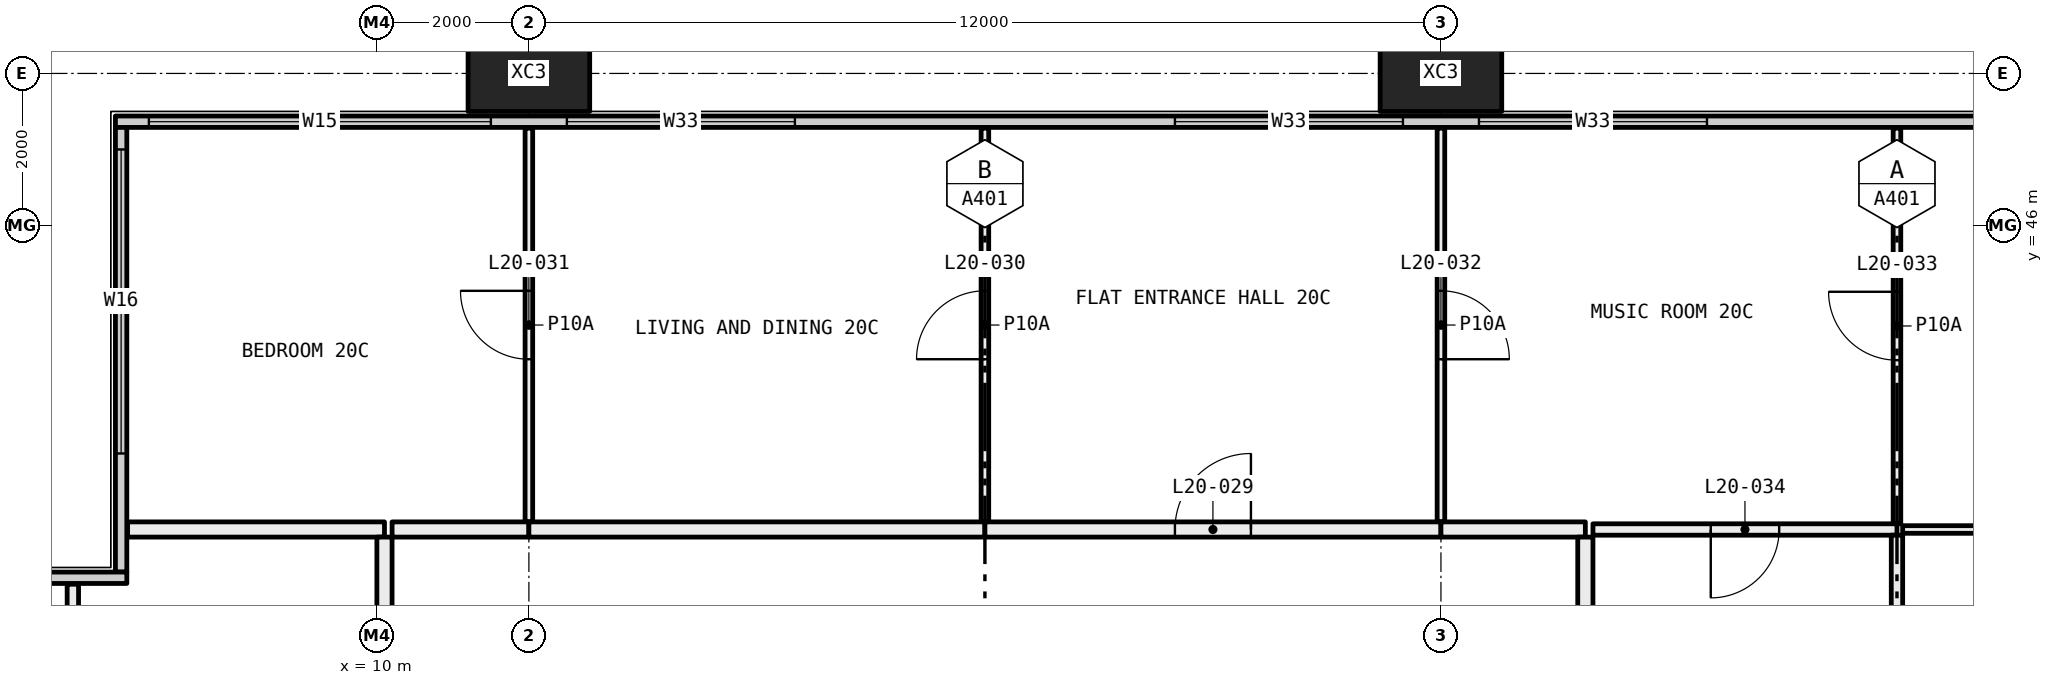
"""IFC4 building model, lengths in metres.
Left out: names, types, materials, properties, quantities, classifications, styles, units other than length and angle.
Written with IfcOpenShell. Run it as: python <this file> out.ifc"""

import sys

from ifc_helpers import new_model, si_unit, direction, frame, frame_2d, origin, origin_2d, place, context, subcontext, project, spatial, rectangle, hollow_rectangle, extrude, element, fill, save


model = new_model("IFC4")
c1 = context("Model", 3, precision=1e-05, world=origin(), true_north=direction((0.0, 1.0)))
c2 = subcontext(c1, "Body", "Model", "MODEL_VIEW")
j1 = project(units=[si_unit("LENGTHUNIT", "METRE"), si_unit("PLANEANGLEUNIT", "RADIAN")], contexts=[c1])
p1 = place(None, origin())
s1 = spatial("IfcSite", under=j1, at=p1, CompositionType="ELEMENT")
p2 = place(p1, origin())
s2 = spatial("IfcBuilding", under=s1, at=p2, CompositionType="ELEMENT")
p3 = place(p2, frame((0.0, 0.0, 81.75)))
s3 = spatial("IfcBuildingStorey", under=s2, at=p3, CompositionType="ELEMENT", Elevation=81.75)
for number, where, z_axis, x_axis in (
    (1, (12.0, 48.0, -0.4), (0.0, 0.0, 1.0), (1.0, 0.0, 0.0)),
    (2, (24.0, 48.0, -0.4), (0.0, 0.0, 1.0), (1.0, 0.0, 0.0)),
):
    element("IfcColumn", number, at=place(p3, frame(where, z_axis=z_axis, x_axis=x_axis)), inside=s3, PredefinedType="COLUMN", context=c2, shape_type="SweptSolid", body=[
        extrude(hollow_rectangle(XDim=1.6, YDim=1.0, WallThickness=0.065, at=origin_2d()), origin(), (0.0, 0.0, 1.0), 3.45),
    ])
p4 = place(p3, frame((6.56, 47.365, 0.0), z_axis=(0.0, 0.0, 1.0), x_axis=(1.0, 0.0, 0.0)))
e3 = element("IfcWall", 3, at=p4, inside=s3, PredefinedType="ELEMENTEDWALL", context=c2, shape_type="SweptSolid", body=[
    extrude(rectangle(XDim=58.88, YDim=0.15, at=frame_2d((29.44, 0.0))), origin(), (0.0, 0.0, 1.0), 3.05),
])
p5 = place(p4, frame((0.44, 0.0, 0.45)))
e4 = element("IfcOpeningElement", 4, at=p5, cuts=e3, PredefinedType="OPENING", context=c2, shape_type="SweptSolid", body=[
    extrude(rectangle(XDim=4.5, YDim=2.55, at=frame_2d((2.25, 1.275))), frame((0.0, 0.085, 0.0), z_axis=(0.0, -1.0, 0.0), x_axis=(1.0, 0.0, 0.0)), (0.0, 0.0, 1.0), 0.17),
])
p6 = place(p4, frame((5.94, 0.0, 0.45)))
e5 = element("IfcOpeningElement", 5, at=p6, cuts=e3, PredefinedType="OPENING", context=c2, shape_type="SweptSolid", body=[
    extrude(rectangle(XDim=3.0, YDim=2.55, at=frame_2d((1.5, 1.275))), frame((0.0, 0.085, 0.0), z_axis=(0.0, -1.0, 0.0), x_axis=(1.0, 0.0, 0.0)), (0.0, 0.0, 1.0), 0.17),
])
p7 = place(p4, frame((13.94, 0.0, 0.45)))
e6 = element("IfcOpeningElement", 6, at=p7, cuts=e3, PredefinedType="OPENING", context=c2, shape_type="SweptSolid", body=[
    extrude(rectangle(XDim=3.0, YDim=2.55, at=frame_2d((1.5, 1.275))), frame((0.0, 0.085, 0.0), z_axis=(0.0, -1.0, 0.0), x_axis=(1.0, 0.0, 0.0)), (0.0, 0.0, 1.0), 0.17),
])
p8 = place(p4, frame((17.94, 0.0, 0.45)))
e7 = element("IfcOpeningElement", 7, at=p8, cuts=e3, PredefinedType="OPENING", context=c2, shape_type="SweptSolid", body=[
    extrude(rectangle(XDim=3.0, YDim=2.55, at=frame_2d((1.5, 1.275))), frame((0.0, 0.085, 0.0), z_axis=(0.0, -1.0, 0.0), x_axis=(1.0, 0.0, 0.0)), (0.0, 0.0, 1.0), 0.17),
])
p9 = place(p4, frame((26.94, 0.0, 0.45)))
e8 = element("IfcOpeningElement", 8, at=p9, cuts=e3, PredefinedType="OPENING", context=c2, shape_type="SweptSolid", body=[
    extrude(rectangle(XDim=2.0, YDim=2.55, at=frame_2d((1.0, 1.275))), frame((0.0, 0.085, 0.0), z_axis=(0.0, -1.0, 0.0), x_axis=(1.0, 0.0, 0.0)), (0.0, 0.0, 1.0), 0.17),
])
p10 = place(p4, frame((29.94, 0.0, 0.45)))
e9 = element("IfcOpeningElement", 9, at=p10, cuts=e3, PredefinedType="OPENING", context=c2, shape_type="SweptSolid", body=[
    extrude(rectangle(XDim=3.0, YDim=2.55, at=frame_2d((1.5, 1.275))), frame((0.0, 0.085, 0.0), z_axis=(0.0, -1.0, 0.0), x_axis=(1.0, 0.0, 0.0)), (0.0, 0.0, 1.0), 0.17),
])
p11 = place(p4, frame((37.94, 0.0, 0.45)))
e10 = element("IfcOpeningElement", 10, at=p11, cuts=e3, PredefinedType="OPENING", context=c2, shape_type="SweptSolid", body=[
    extrude(rectangle(XDim=3.0, YDim=2.55, at=frame_2d((1.5, 1.275))), frame((0.0, 0.085, 0.0), z_axis=(0.0, -1.0, 0.0), x_axis=(1.0, 0.0, 0.0)), (0.0, 0.0, 1.0), 0.17),
])
p12 = place(p4, frame((41.94, 0.0, 0.45)))
e11 = element("IfcOpeningElement", 11, at=p12, cuts=e3, PredefinedType="OPENING", context=c2, shape_type="SweptSolid", body=[
    extrude(rectangle(XDim=3.0, YDim=2.55, at=frame_2d((1.5, 1.275))), frame((0.0, 0.085, 0.0), z_axis=(0.0, -1.0, 0.0), x_axis=(1.0, 0.0, 0.0)), (0.0, 0.0, 1.0), 0.17),
])
p13 = place(p4, frame((50.94, 0.0, 0.45)))
e12 = element("IfcOpeningElement", 12, at=p13, cuts=e3, PredefinedType="OPENING", context=c2, shape_type="SweptSolid", body=[
    extrude(rectangle(XDim=2.0, YDim=2.55, at=frame_2d((1.0, 1.275))), frame((0.0, 0.085, 0.0), z_axis=(0.0, -1.0, 0.0), x_axis=(1.0, 0.0, 0.0)), (0.0, 0.0, 1.0), 0.17),
])
p14 = place(p4, frame((53.94, 0.0, 0.45)))
e13 = element("IfcOpeningElement", 13, at=p14, cuts=e3, PredefinedType="OPENING", context=c2, shape_type="SweptSolid", body=[
    extrude(rectangle(XDim=4.5, YDim=2.55, at=frame_2d((2.25, 1.275))), frame((0.0, 0.085, 0.0), z_axis=(0.0, -1.0, 0.0), x_axis=(1.0, 0.0, 0.0)), (0.0, 0.0, 1.0), 0.17),
])
p15 = place(p3, frame((6.635, 41.44, 0.0), z_axis=(0.0, 0.0, 1.0), x_axis=(0.0, 1.0, 0.0)))
e14 = element("IfcWall", 14, at=p15, inside=s3, PredefinedType="ELEMENTEDWALL", context=c2, shape_type="SweptSolid", body=[
    extrude(rectangle(XDim=5.85, YDim=0.15, at=frame_2d((2.925, 0.0))), origin(), (0.0, 0.0, 1.0), 3.05),
])
p16 = place(p15, frame((1.56, 0.0, 0.45)))
e15 = element("IfcOpeningElement", 15, at=p16, cuts=e14, PredefinedType="OPENING", context=c2, shape_type="SweptSolid", body=[
    extrude(rectangle(XDim=4.0, YDim=2.55, at=frame_2d((2.0, 1.275))), frame((0.0, 0.085, 0.0), z_axis=(0.0, -1.0, 0.0), x_axis=(1.0, 0.0, 0.0)), (0.0, 0.0, 1.0), 0.17),
])
p17 = place(p3, frame((0.56, 41.365, 0.0), z_axis=(0.0, 0.0, 1.0), x_axis=(1.0, 0.0, 0.0)))
e16 = element("IfcWall", 16, at=p17, inside=s3, PredefinedType="ELEMENTEDWALL", context=c2, shape_type="SweptSolid", body=[
    extrude(rectangle(XDim=6.15, YDim=0.15, at=frame_2d((3.075, 0.0))), origin(), (0.0, 0.0, 1.0), 3.05),
])
p18 = place(p17, frame((0.44, 0.0, 0.45)))
e17 = element("IfcOpeningElement", 17, at=p18, cuts=e16, PredefinedType="OPENING", context=c2, shape_type="SweptSolid", body=[
    extrude(rectangle(XDim=4.0, YDim=2.55, at=frame_2d((2.0, 1.275))), frame((0.0, 0.085, 0.0), z_axis=(0.0, -1.0, 0.0), x_axis=(1.0, 0.0, 0.0)), (0.0, 0.0, 1.0), 0.17),
])
p19 = place(p3, frame((6.0, 37.5, 0.0), z_axis=(0.0, 0.0, 1.0), x_axis=(0.0, 1.0, 0.0)))
e18 = element("IfcWall", 18, at=p19, inside=s3, PredefinedType="PARTITIONING", context=c2, shape_type="SweptSolid", body=[
    extrude(rectangle(XDim=3.78, YDim=0.15, at=frame_2d((1.89, 0.0))), origin(), (0.0, 0.0, 1.0), 3.05),
])
p20 = place(p3, frame((10.1, 42.0, 0.0), z_axis=(0.0, 0.0, 1.0), x_axis=(-1.0, 0.0, 0.0)))
e19 = element("IfcWall", 19, at=p20, inside=s3, PredefinedType="PARTITIONING", context=c2, shape_type="SweptSolid", body=[
    extrude(rectangle(XDim=3.38, YDim=0.2, at=frame_2d((1.69, 0.0))), origin(), (0.0, 0.0, 1.0), 3.05),
])
p21 = place(p3, frame((10.1, 37.5, 0.0), z_axis=(0.0, 0.0, 1.0), x_axis=(0.0, 1.0, 0.0)))
e20 = element("IfcWall", 20, at=p21, inside=s3, PredefinedType="PARTITIONING", context=c2, shape_type="SweptSolid", body=[
    extrude(rectangle(XDim=4.4, YDim=0.2, at=frame_2d((2.2, 0.0))), origin(), (0.0, 0.0, 1.0), 3.05),
])
p22 = place(p3, frame((12.0, 42.1, 0.0), z_axis=(0.0, 0.0, 1.0), x_axis=(0.0, 1.0, 0.0)))
e21 = element("IfcWall", 21, at=p22, inside=s3, PredefinedType="PARTITIONING", context=c2, shape_type="SweptSolid", body=[
    extrude(rectangle(XDim=5.18, YDim=0.1, at=frame_2d((2.59, 0.0))), origin(), (0.0, 0.0, 1.0), 3.05),
])
p23 = place(p22, frame((2.14, 0.0, 0.0)))
e22 = element("IfcOpeningElement", 22, at=p23, cuts=e21, PredefinedType="OPENING", context=c2, shape_type="SweptSolid", body=[
    extrude(rectangle(XDim=0.9, YDim=2.1, at=frame_2d((0.45, 1.05))), frame((0.0, 0.06, 0.0), z_axis=(0.0, -1.0, 0.0), x_axis=(1.0, 0.0, 0.0)), (0.0, 0.0, 1.0), 0.12),
])
p24 = place(p3, frame((10.2, 42.0, 0.0), z_axis=(0.0, 0.0, 1.0), x_axis=(1.0, 0.0, 0.0)))
e23 = element("IfcWall", 23, at=p24, inside=s3, PredefinedType="PARTITIONING", context=c2, shape_type="SweptSolid", body=[
    extrude(rectangle(XDim=1.8, YDim=0.2, at=frame_2d((0.9, 0.0))), origin(), (0.0, 0.0, 1.0), 3.05),
])
p25 = place(p3, frame((18.0, 42.1, 0.0), z_axis=(0.0, 0.0, 1.0), x_axis=(0.0, 1.0, 0.0)))
e24 = element("IfcWall", 24, at=p25, inside=s3, PredefinedType="PARTITIONING", context=c2, shape_type="SweptSolid", body=[
    extrude(rectangle(XDim=5.18, YDim=0.1, at=frame_2d((2.59, 0.0))), origin(), (0.0, 0.0, 1.0), 3.05),
])
p26 = place(p25, frame((2.14, 0.0, 0.0)))
e25 = element("IfcOpeningElement", 25, at=p26, cuts=e24, PredefinedType="OPENING", context=c2, shape_type="SweptSolid", body=[
    extrude(rectangle(XDim=0.9, YDim=2.1, at=frame_2d((0.45, 1.05))), frame((0.0, 0.06, 0.0), z_axis=(0.0, -1.0, 0.0), x_axis=(1.0, 0.0, 0.0)), (0.0, 0.0, 1.0), 0.12),
])
p27 = place(p3, frame((12.0, 42.0, 0.0), z_axis=(0.0, 0.0, 1.0), x_axis=(1.0, 0.0, 0.0)))
e26 = element("IfcWall", 26, at=p27, inside=s3, PredefinedType="PARTITIONING", context=c2, shape_type="SweptSolid", body=[
    extrude(rectangle(XDim=6.0, YDim=0.2, at=frame_2d((3.0, 0.0))), origin(), (0.0, 0.0, 1.0), 3.05),
])
p28 = place(p3, frame((24.0, 42.1, 0.0), z_axis=(0.0, 0.0, 1.0), x_axis=(0.0, 1.0, 0.0)))
e27 = element("IfcWall", 27, at=p28, inside=s3, PredefinedType="PARTITIONING", context=c2, shape_type="SweptSolid", body=[
    extrude(rectangle(XDim=5.18, YDim=0.1, at=frame_2d((2.59, 0.0))), origin(), (0.0, 0.0, 1.0), 3.05),
])
p29 = place(p28, frame((2.14, 0.0, 0.0)))
e28 = element("IfcOpeningElement", 28, at=p29, cuts=e27, PredefinedType="OPENING", context=c2, shape_type="SweptSolid", body=[
    extrude(rectangle(XDim=0.9, YDim=2.1, at=frame_2d((0.45, 1.05))), frame((0.0, 0.06, 0.0), z_axis=(0.0, -1.0, 0.0), x_axis=(1.0, 0.0, 0.0)), (0.0, 0.0, 1.0), 0.12),
])
p30 = place(p3, frame((18.0, 42.0, 0.0), z_axis=(0.0, 0.0, 1.0), x_axis=(1.0, 0.0, 0.0)))
e29 = element("IfcWall", 29, at=p30, inside=s3, PredefinedType="PARTITIONING", context=c2, shape_type="SweptSolid", body=[
    extrude(rectangle(XDim=6.0, YDim=0.2, at=frame_2d((3.0, 0.0))), origin(), (0.0, 0.0, 1.0), 3.05),
])
p31 = place(p30, frame((2.5, 0.0, 0.0)))
e30 = element("IfcOpeningElement", 30, at=p31, cuts=e29, PredefinedType="OPENING", context=c2, shape_type="SweptSolid", body=[
    extrude(rectangle(XDim=1.0, YDim=2.1, at=frame_2d((0.5, 1.05))), frame((0.0, 0.11, 0.0), z_axis=(0.0, -1.0, 0.0), x_axis=(1.0, 0.0, 0.0)), (0.0, 0.0, 1.0), 0.22),
])
p32 = place(p3, frame((30.0, 42.075, 0.0), z_axis=(0.0, 0.0, 1.0), x_axis=(0.0, 1.0, 0.0)))
e31 = element("IfcWall", 31, at=p32, inside=s3, PredefinedType="PARTITIONING", context=c2, shape_type="SweptSolid", body=[
    extrude(rectangle(XDim=5.205, YDim=0.1, at=frame_2d((2.603, 0.0))), origin(), (0.0, 0.0, 1.0), 3.05),
])
p33 = place(p32, frame((2.153, 0.0, 0.0)))
e32 = element("IfcOpeningElement", 32, at=p33, cuts=e31, PredefinedType="OPENING", context=c2, shape_type="SweptSolid", body=[
    extrude(rectangle(XDim=0.9, YDim=2.1, at=frame_2d((0.45, 1.05))), frame((0.0, 0.06, 0.0), z_axis=(0.0, -1.0, 0.0), x_axis=(1.0, 0.0, 0.0)), (0.0, 0.0, 1.0), 0.12),
])
p34 = place(p3, frame((26.0, 42.0, 0.0), z_axis=(0.0, 0.0, 1.0), x_axis=(1.0, 0.0, 0.0)))
e33 = element("IfcWall", 33, at=p34, inside=s3, PredefinedType="PARTITIONING", context=c2, shape_type="SweptSolid", body=[
    extrude(rectangle(XDim=4.0, YDim=0.15, at=frame_2d((2.0, 0.0))), origin(), (0.0, 0.0, 1.0), 3.05),
])
p35 = place(p34, frame((1.55, 0.0, 0.0)))
e34 = element("IfcOpeningElement", 34, at=p35, cuts=e33, PredefinedType="OPENING", context=c2, shape_type="SweptSolid", body=[
    extrude(rectangle(XDim=0.9, YDim=2.1, at=frame_2d((0.45, 1.05))), frame((0.0, 0.085, 0.0), z_axis=(0.0, -1.0, 0.0), x_axis=(1.0, 0.0, 0.0)), (0.0, 0.0, 1.0), 0.17),
])
p36 = place(p3, frame((24.0, 42.0, 0.0), z_axis=(0.0, 0.0, 1.0), x_axis=(1.0, 0.0, 0.0)))
e35 = element("IfcWall", 35, at=p36, inside=s3, PredefinedType="PARTITIONING", context=c2, shape_type="SweptSolid", body=[
    extrude(rectangle(XDim=1.9, YDim=0.2, at=frame_2d((0.95, 0.0))), origin(), (0.0, 0.0, 1.0), 3.05),
])
p37 = place(p3, frame((30.075, 42.0, 0.0), z_axis=(0.0, 0.0, 1.0), x_axis=(1.0, 0.0, 0.0)))
e36 = element("IfcWall", 36, at=p37, inside=s3, PredefinedType="PARTITIONING", context=c2, shape_type="SweptSolid", body=[
    extrude(rectangle(XDim=4.425, YDim=0.1, at=frame_2d((2.212, 0.0))), origin(), (0.0, 0.0, 1.0), 3.05),
])
p38 = place(p37, frame((1.762, 0.0, 0.0)))
e37 = element("IfcOpeningElement", 37, at=p38, cuts=e36, PredefinedType="OPENING", context=c2, shape_type="SweptSolid", body=[
    extrude(rectangle(XDim=0.9, YDim=2.1, at=frame_2d((0.45, 1.05))), frame((0.0, 0.06, 0.0), z_axis=(0.0, -1.0, 0.0), x_axis=(1.0, 0.0, 0.0)), (0.0, 0.0, 1.0), 0.12),
])
p39 = place(p3, frame((30.0, 38.175, 0.0), z_axis=(0.0, 0.0, 1.0), x_axis=(0.0, 1.0, 0.0)))
e38 = element("IfcWall", 38, at=p39, inside=s3, PredefinedType="PARTITIONING", context=c2, shape_type="SweptSolid", body=[
    extrude(rectangle(XDim=3.75, YDim=0.15, at=frame_2d((1.875, 0.0))), origin(), (0.0, 0.0, 1.0), 3.05),
])
p40 = place(p3, frame((25.9, 41.9, 0.0), z_axis=(0.0, 0.0, 1.0), x_axis=(0.0, -1.0, 0.0)))
e39 = element("IfcWall", 39, at=p40, inside=s3, PredefinedType="PARTITIONING", context=c2, shape_type="SweptSolid", body=[
    extrude(rectangle(XDim=3.8, YDim=0.2, at=frame_2d((1.9, 0.0))), origin(), (0.0, 0.0, 1.0), 3.05),
])
p41 = place(p5, origin())
e40 = element("IfcWindow", 40, at=p41, inside=s3, PartitioningType="SINGLE_PANEL", PredefinedType="WINDOW", context=c2, shape_type="SweptSolid", body=[
    extrude(rectangle(XDim=4.5, YDim=2.55, at=frame_2d((2.25, 1.275))), frame((0.0, 0.03, 0.0), z_axis=(0.0, -1.0, 0.0), x_axis=(1.0, 0.0, 0.0)), (0.0, 0.0, 1.0), 0.06),
])
fill(e4, e40)
p42 = place(p6, origin())
e41 = element("IfcWindow", 41, at=p42, inside=s3, PartitioningType="SINGLE_PANEL", PredefinedType="WINDOW", context=c2, shape_type="SweptSolid", body=[
    extrude(rectangle(XDim=3.0, YDim=2.55, at=frame_2d((1.5, 1.275))), frame((0.0, 0.03, 0.0), z_axis=(0.0, -1.0, 0.0), x_axis=(1.0, 0.0, 0.0)), (0.0, 0.0, 1.0), 0.06),
])
fill(e5, e41)
p43 = place(p7, origin())
e42 = element("IfcWindow", 42, at=p43, inside=s3, PartitioningType="SINGLE_PANEL", PredefinedType="WINDOW", context=c2, shape_type="SweptSolid", body=[
    extrude(rectangle(XDim=3.0, YDim=2.55, at=frame_2d((1.5, 1.275))), frame((0.0, 0.03, 0.0), z_axis=(0.0, -1.0, 0.0), x_axis=(1.0, 0.0, 0.0)), (0.0, 0.0, 1.0), 0.06),
])
fill(e6, e42)
p44 = place(p8, origin())
e43 = element("IfcWindow", 43, at=p44, inside=s3, PartitioningType="SINGLE_PANEL", PredefinedType="WINDOW", context=c2, shape_type="SweptSolid", body=[
    extrude(rectangle(XDim=3.0, YDim=2.55, at=frame_2d((1.5, 1.275))), frame((0.0, 0.03, 0.0), z_axis=(0.0, -1.0, 0.0), x_axis=(1.0, 0.0, 0.0)), (0.0, 0.0, 1.0), 0.06),
])
fill(e7, e43)
p45 = place(p16, origin())
e44 = element("IfcWindow", 44, at=p45, inside=s3, PartitioningType="SINGLE_PANEL", PredefinedType="WINDOW", context=c2, shape_type="SweptSolid", body=[
    extrude(rectangle(XDim=4.0, YDim=2.55, at=frame_2d((2.0, 1.275))), frame((0.0, 0.03, 0.0), z_axis=(0.0, -1.0, 0.0), x_axis=(1.0, 0.0, 0.0)), (0.0, 0.0, 1.0), 0.06),
])
fill(e15, e44)
p46 = place(p31, origin())
e45 = element("IfcDoor", 45, at=p46, inside=s3, OperationType="SINGLE_SWING_LEFT", PredefinedType="DOOR", context=c2, shape_type="SweptSolid", body=[
    extrude(rectangle(XDim=1.0, YDim=2.1, at=frame_2d((0.5, 1.05))), frame((0.0, 0.025, 0.0), z_axis=(0.0, -1.0, 0.0), x_axis=(1.0, 0.0, 0.0)), (0.0, 0.0, 1.0), 0.05),
])
fill(e30, e45)
p47 = place(p26, origin())
e46 = element("IfcDoor", 46, at=p47, inside=s3, OperationType="SINGLE_SWING_RIGHT", PredefinedType="DOOR", context=c2, shape_type="SweptSolid", body=[
    extrude(rectangle(XDim=0.9, YDim=2.1, at=frame_2d((0.45, 1.05))), frame((0.0, 0.025, 0.0), z_axis=(0.0, -1.0, 0.0), x_axis=(1.0, 0.0, 0.0)), (0.0, 0.0, 1.0), 0.05),
])
fill(e25, e46)
p48 = place(p23, origin())
e47 = element("IfcDoor", 47, at=p48, inside=s3, OperationType="SINGLE_SWING_LEFT", PredefinedType="DOOR", context=c2, shape_type="SweptSolid", body=[
    extrude(rectangle(XDim=0.9, YDim=2.1, at=frame_2d((0.45, 1.05))), frame((0.0, 0.025, 0.0), z_axis=(0.0, -1.0, 0.0), x_axis=(1.0, 0.0, 0.0)), (0.0, 0.0, 1.0), 0.05),
])
fill(e22, e47)
p49 = place(p29, frame((0.9, 0.0, 0.0), x_axis=(-1.0, 0.0, 0.0)))
e48 = element("IfcDoor", 48, at=p49, inside=s3, OperationType="SINGLE_SWING_LEFT", PredefinedType="DOOR", context=c2, shape_type="SweptSolid", body=[
    extrude(rectangle(XDim=0.9, YDim=2.1, at=frame_2d((0.45, 1.05))), frame((0.0, 0.025, 0.0), z_axis=(0.0, -1.0, 0.0), x_axis=(1.0, 0.0, 0.0)), (0.0, 0.0, 1.0), 0.05),
])
fill(e28, e48)
p50 = place(p33, origin())
e49 = element("IfcDoor", 49, at=p50, inside=s3, OperationType="SINGLE_SWING_LEFT", PredefinedType="DOOR", context=c2, shape_type="SweptSolid", body=[
    extrude(rectangle(XDim=0.9, YDim=2.1, at=frame_2d((0.45, 1.05))), frame((0.0, 0.025, 0.0), z_axis=(0.0, -1.0, 0.0), x_axis=(1.0, 0.0, 0.0)), (0.0, 0.0, 1.0), 0.05),
])
fill(e32, e49)
p51 = place(p35, frame((0.9, 0.0, 0.0), x_axis=(-1.0, 0.0, 0.0)))
e50 = element("IfcDoor", 50, at=p51, inside=s3, OperationType="SINGLE_SWING_LEFT", PredefinedType="DOOR", context=c2, shape_type="SweptSolid", body=[
    extrude(rectangle(XDim=0.9, YDim=2.1, at=frame_2d((0.45, 1.05))), frame((0.0, 0.025, 0.0), z_axis=(0.0, -1.0, 0.0), x_axis=(1.0, 0.0, 0.0)), (0.0, 0.0, 1.0), 0.05),
])
fill(e34, e50)
save(model, sys.argv[1])
